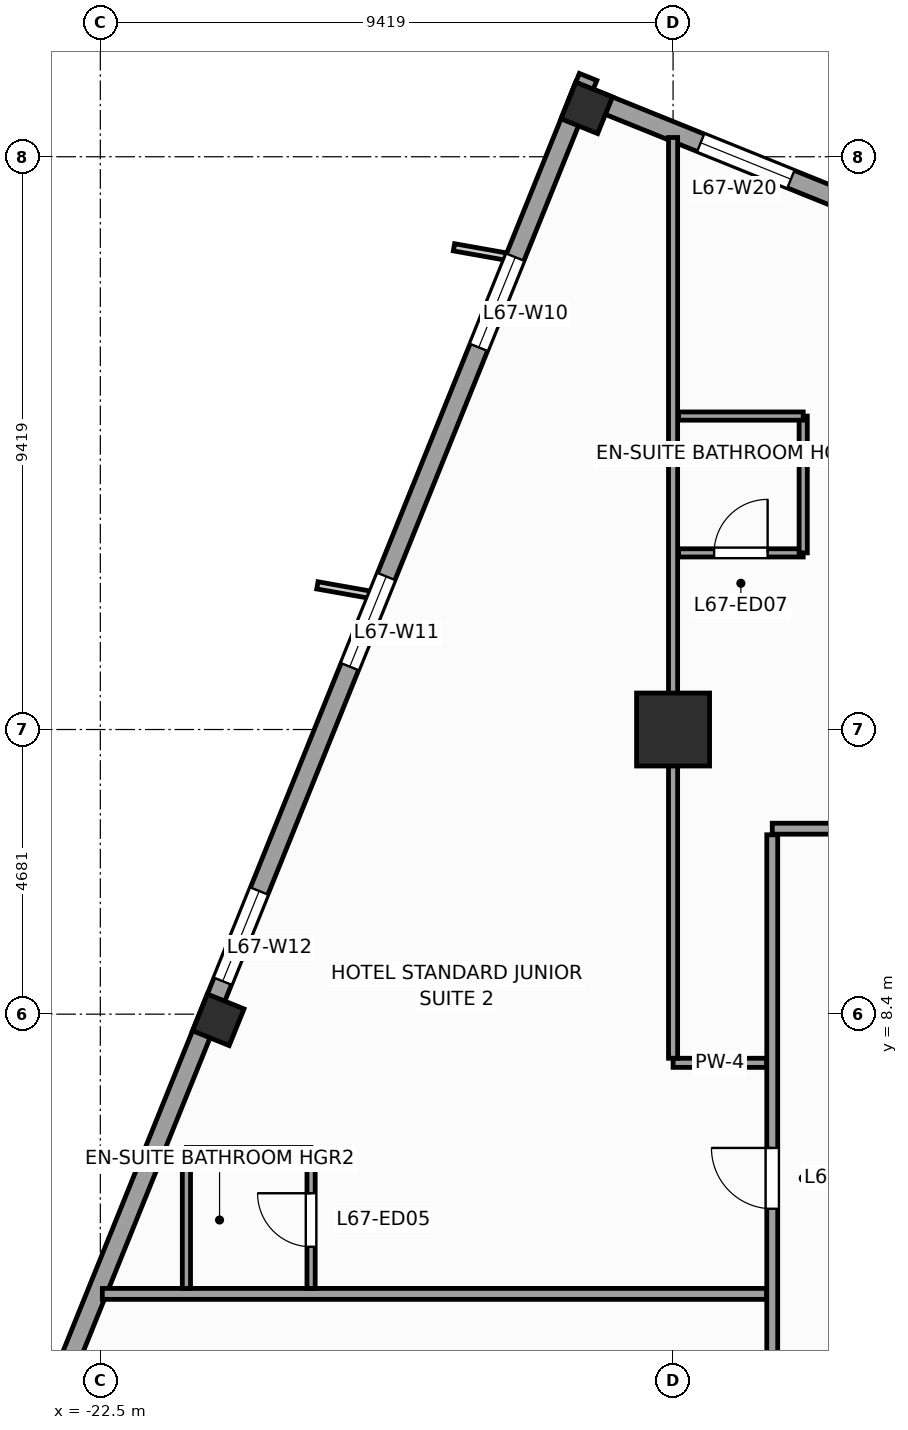
"""IFC4 building model, lengths in metres.
Left out: names, types, materials, properties, quantities, classifications, styles, units other than length and angle.
Written with IfcOpenShell. Run it as: python <this file> out.ifc"""

import sys

from ifc_helpers import new_model, si_unit, direction, frame, frame_2d, origin, origin_2d, place, context, subcontext, project, spatial, rectangle, extrude, source, transform, mapped, element, fill, save


model = new_model("IFC4")
c1 = context("Model", 3, precision=1e-05, world=origin(), true_north=direction((0.0, 1.0)))
c2 = subcontext(c1, "Body", "Model", "MODEL_VIEW")
j1 = project(units=[si_unit("LENGTHUNIT", "METRE"), si_unit("PLANEANGLEUNIT", "RADIAN")], contexts=[c1])
p1 = place(None, origin())
s1 = spatial("IfcSite", under=j1, at=p1, CompositionType="ELEMENT")
p2 = place(p1, origin())
s2 = spatial("IfcBuilding", under=s1, at=p2, CompositionType="ELEMENT")
p3 = place(p2, frame((0.0, 0.0, 276.0)))
s3 = spatial("IfcBuildingStorey", under=s2, at=p3, CompositionType="ELEMENT", Elevation=276.0)
m1 = source(origin(), c2, "Body", "SweptSolid", [
    extrude(rectangle(XDim=1.2, YDim=1.2, at=origin_2d()), origin(), (0.0, 0.0, 1.0), 3.6),
])
p4 = place(p3, frame((-13.081, 13.081, 0.0), z_axis=(0.0, 0.0, 1.0), x_axis=(1.0, 0.0, 0.0)))
e1 = element("IfcColumn", 1, at=p4, inside=s3, PredefinedType="COLUMN", context=c2, shape_type="MappedRepresentation", body=[
    mapped(m1, transform((0.0, 0.0, 0.0), scale=1.0)),
])
m2 = source(origin(), c2, "Body", "SweptSolid", [
    extrude(rectangle(XDim=0.65, YDim=0.65, at=origin_2d()), origin(), (0.0, 0.0, 1.0), 3.6),
])
for number, where, z_axis, x_axis in (
    (2, (-14.501, 23.304, 0.0), (0.0, 0.0, 1.0), (0.375, 0.927, 0.0)),
    (3, (-20.56, 8.307, 0.0), (0.0, 0.0, 1.0), (0.375, 0.927, 0.0)),
):
    element("IfcColumn", number, at=place(p3, frame(where, z_axis=z_axis, x_axis=x_axis)), inside=s3, PredefinedType="COLUMN", context=c2, shape_type="MappedRepresentation", body=[
        mapped(m2, transform((0.0, 0.0, 0.0), scale=1.0)),
    ])
p5 = place(p3, frame((-9.032, 21.278, 0.0), z_axis=(0.0, 0.0, 1.0), x_axis=(-0.927185411764, 0.374602739196, 0.0)))
e4 = element("IfcWall", 4, at=p5, inside=s3, PredefinedType="STANDARD", context=c2, shape_type="SweptSolid", body=[
    extrude(rectangle(XDim=6.155, YDim=0.31, at=frame_2d((3.078, 0.0))), origin(), (0.0, 0.0, 1.0), 3.35),
])
p6 = place(p5, frame((2.278, 0.0, 0.47)))
e5 = element("IfcOpeningElement", 5, at=p6, cuts=e4, PredefinedType="OPENING", context=c2, shape_type="SweptSolid", body=[
    extrude(rectangle(XDim=1.6, YDim=2.1, at=frame_2d((0.8, 1.05))), frame((0.0, 0.165, 0.0), z_axis=(0.0, -1.0, 0.0), x_axis=(1.0, 0.0, 0.0)), (0.0, 0.0, 1.0), 0.33),
])
p7 = place(p3, frame((-14.479, 23.813, 0.0), z_axis=(0.0, 0.0, 1.0), x_axis=(-0.374609557019, -0.927182657188, 0.0)))
e6 = element("IfcWall", 6, at=p7, inside=s3, PredefinedType="STANDARD", context=c2, shape_type="SweptSolid", body=[
    extrude(rectangle(XDim=33.31, YDim=0.31, at=frame_2d((16.655, 0.0))), origin(), (0.0, 0.0, 1.0), 2.75),
])
p8 = place(p7, frame((3.197, 0.0, 0.47)))
e7 = element("IfcOpeningElement", 7, at=p8, cuts=e6, PredefinedType="OPENING", context=c2, shape_type="SweptSolid", body=[
    extrude(rectangle(XDim=1.6, YDim=2.1, at=frame_2d((0.8, 1.05))), frame((0.0, 0.165, 0.0), z_axis=(0.0, -1.0, 0.0), x_axis=(1.0, 0.0, 0.0)), (0.0, 0.0, 1.0), 0.33),
])
p9 = place(p7, frame((8.86, 0.0, 0.47)))
e8 = element("IfcOpeningElement", 8, at=p9, cuts=e6, PredefinedType="OPENING", context=c2, shape_type="SweptSolid", body=[
    extrude(rectangle(XDim=1.6, YDim=2.1, at=frame_2d((0.8, 1.05))), frame((0.0, 0.165, 0.0), z_axis=(0.0, -1.0, 0.0), x_axis=(1.0, 0.0, 0.0)), (0.0, 0.0, 1.0), 0.33),
])
p10 = place(p7, frame((14.439, 0.0, 0.47)))
e9 = element("IfcOpeningElement", 9, at=p10, cuts=e6, PredefinedType="OPENING", context=c2, shape_type="SweptSolid", body=[
    extrude(rectangle(XDim=1.6, YDim=2.1, at=frame_2d((0.8, 1.05))), frame((0.0, 0.165, 0.0), z_axis=(0.0, -1.0, 0.0), x_axis=(1.0, 0.0, 0.0)), (0.0, 0.0, 1.0), 0.33),
])
p11 = place(p7, frame((23.351, 0.0, 0.47)))
e10 = element("IfcOpeningElement", 10, at=p11, cuts=e6, PredefinedType="OPENING", context=c2, shape_type="SweptSolid", body=[
    extrude(rectangle(XDim=1.6, YDim=2.1, at=frame_2d((0.8, 1.05))), frame((0.0, 0.165, 0.0), z_axis=(0.0, -1.0, 0.0), x_axis=(1.0, 0.0, 0.0)), (0.0, 0.0, 1.0), 0.33),
])
p12 = place(p7, frame((30.097, 0.0, 0.47)))
e11 = element("IfcOpeningElement", 11, at=p12, cuts=e6, PredefinedType="OPENING", context=c2, shape_type="SweptSolid", body=[
    extrude(rectangle(XDim=1.6, YDim=2.1, at=frame_2d((0.8, 1.05))), frame((0.0, 0.165, 0.0), z_axis=(0.0, -1.0, 0.0), x_axis=(1.0, 0.0, 0.0)), (0.0, 0.0, 1.0), 0.33),
])
p13 = place(p7, frame((27.59, 0.0, 0.47)))
e12 = element("IfcOpeningElement", 12, at=p13, cuts=e6, PredefinedType="OPENING", context=c2, shape_type="SweptSolid", body=[
    extrude(rectangle(XDim=1.6, YDim=2.1, at=frame_2d((0.8, 1.05))), frame((0.0, 0.165, 0.0), z_axis=(0.0, -1.0, 0.0), x_axis=(1.0, 0.0, 0.0)), (0.0, 0.0, 1.0), 0.33),
])
p14 = place(p3, frame((-11.45, 11.45, 0.0), z_axis=(0.0, 0.0, 1.0), x_axis=(1.0, 0.0, 0.0)))
e13 = element("IfcWall", 13, at=p14, inside=s3, PredefinedType="PARTITIONING", context=c2, shape_type="SweptSolid", body=[
    extrude(rectangle(XDim=21.75, YDim=0.18, at=frame_2d((10.875, 0.0))), origin(), (0.0, 0.0, 1.0), 3.35),
])
p15 = place(p14, frame((2.639, 0.0, 0.0)))
e14 = element("IfcOpeningElement", 14, at=p15, cuts=e13, PredefinedType="OPENING", context=c2, shape_type="SweptSolid", body=[
    extrude(rectangle(XDim=1.0, YDim=2.15, at=frame_2d((0.5, 1.075))), frame((0.0, 0.1, 0.0), z_axis=(0.0, -1.0, 0.0), x_axis=(1.0, 0.0, 0.0)), (0.0, 0.0, 1.0), 0.2),
])
p16 = place(p14, frame((7.8, 0.0, 0.0)))
e15 = element("IfcOpeningElement", 15, at=p16, cuts=e13, PredefinedType="OPENING", context=c2, shape_type="SweptSolid", body=[
    extrude(rectangle(XDim=1.0, YDim=2.15, at=frame_2d((0.5, 1.075))), frame((0.0, 0.1, 0.0), z_axis=(0.0, -1.0, 0.0), x_axis=(1.0, 0.0, 0.0)), (0.0, 0.0, 1.0), 0.2),
])
p17 = place(p14, frame((12.65, 0.0, 0.0)))
e16 = element("IfcOpeningElement", 16, at=p17, cuts=e13, PredefinedType="OPENING", context=c2, shape_type="SweptSolid", body=[
    extrude(rectangle(XDim=1.0, YDim=2.15, at=frame_2d((0.5, 1.075))), frame((0.0, 0.1, 0.0), z_axis=(0.0, -1.0, 0.0), x_axis=(1.0, 0.0, 0.0)), (0.0, 0.0, 1.0), 0.2),
])
p18 = place(p14, frame((18.036, 0.0, 0.0)))
e17 = element("IfcOpeningElement", 17, at=p18, cuts=e13, PredefinedType="OPENING", context=c2, shape_type="SweptSolid", body=[
    extrude(rectangle(XDim=1.0, YDim=2.15, at=frame_2d((0.5, 1.075))), frame((0.0, 0.1, 0.0), z_axis=(0.0, -1.0, 0.0), x_axis=(1.0, 0.0, 0.0)), (0.0, 0.0, 1.0), 0.2),
])
p19 = place(p3, frame((-11.45, -12.35, 0.0), z_axis=(0.0, 0.0, 1.0), x_axis=(0.0, 1.0, 0.0)))
e18 = element("IfcWall", 18, at=p19, inside=s3, PredefinedType="PARTITIONING", context=c2, shape_type="SweptSolid", body=[
    extrude(rectangle(XDim=23.7, YDim=0.18, at=frame_2d((11.85, 0.0))), origin(), (0.0, 0.0, 1.0), 3.35),
])
p20 = place(p19, frame((13.75, 0.0, 0.0)))
e19 = element("IfcOpeningElement", 19, at=p20, cuts=e18, PredefinedType="OPENING", context=c2, shape_type="SweptSolid", body=[
    extrude(rectangle(XDim=1.0, YDim=2.15, at=frame_2d((0.5, 1.075))), frame((0.0, 0.1, 0.0), z_axis=(0.0, -1.0, 0.0), x_axis=(1.0, 0.0, 0.0)), (0.0, 0.0, 1.0), 0.2),
])
p21 = place(p19, frame((17.55, 0.0, 0.0)))
e20 = element("IfcOpeningElement", 20, at=p21, cuts=e18, PredefinedType="OPENING", context=c2, shape_type="SweptSolid", body=[
    extrude(rectangle(XDim=1.0, YDim=2.15, at=frame_2d((0.5, 1.075))), frame((0.0, 0.1, 0.0), z_axis=(0.0, -1.0, 0.0), x_axis=(1.0, 0.0, 0.0)), (0.0, 0.0, 1.0), 0.2),
])
p22 = place(p19, frame((6.15, 0.0, 0.0)))
e21 = element("IfcOpeningElement", 21, at=p22, cuts=e18, PredefinedType="OPENING", context=c2, shape_type="SweptSolid", body=[
    extrude(rectangle(XDim=1.0, YDim=2.15, at=frame_2d((0.5, 1.075))), frame((0.0, 0.1, 0.0), z_axis=(0.0, -1.0, 0.0), x_axis=(1.0, 0.0, 0.0)), (0.0, 0.0, 1.0), 0.2),
])
p23 = place(p19, frame((9.95, 0.0, 0.0)))
e22 = element("IfcOpeningElement", 22, at=p23, cuts=e18, PredefinedType="OPENING", context=c2, shape_type="SweptSolid", body=[
    extrude(rectangle(XDim=1.0, YDim=2.15, at=frame_2d((0.5, 1.075))), frame((0.0, 0.1, 0.0), z_axis=(0.0, -1.0, 0.0), x_axis=(1.0, 0.0, 0.0)), (0.0, 0.0, 1.0), 0.2),
])
p24 = place(p3, frame((-11.545, 3.8, 0.0), z_axis=(0.0, 0.0, 1.0), x_axis=(-1.0, 0.0, 0.0)))
e23 = element("IfcWall", 23, at=p24, inside=s3, PredefinedType="PARTITIONING", context=c2, shape_type="SweptSolid", body=[
    extrude(rectangle(XDim=10.923, YDim=0.18, at=frame_2d((5.461, 0.0))), origin(), (0.0, 0.0, 1.0), 3.02),
])
p25 = place(p3, frame((-11.545, 7.6, 0.0), z_axis=(0.0, 0.0, 1.0), x_axis=(-1.0, 0.0, 0.0)))
e24 = element("IfcWall", 24, at=p25, inside=s3, PredefinedType="PARTITIONING", context=c2, shape_type="SweptSolid", body=[
    extrude(rectangle(XDim=1.536, YDim=0.15, at=frame_2d((0.768, 0.0))), origin(), (0.0, 0.0, 1.0), 3.35),
])
p26 = place(p3, frame((-13.081, 7.675, 0.0), z_axis=(0.0, 0.0, 1.0), x_axis=(0.0, 1.0, 0.0)))
e25 = element("IfcWall", 25, at=p26, inside=s3, PredefinedType="PARTITIONING", context=c2, shape_type="SweptSolid", body=[
    extrude(rectangle(XDim=15.142, YDim=0.15, at=frame_2d((7.571, 0.0))), origin(), (0.0, 0.0, 1.0), 2.45),
])
p27 = place(p3, frame((-19.034, 3.89, 0.0), z_axis=(0.0, 0.0, 1.0), x_axis=(0.0, 1.0, 0.0)))
e26 = element("IfcWall", 26, at=p27, inside=s3, PredefinedType="PARTITIONING", context=c2, shape_type="SweptSolid", body=[
    extrude(rectangle(XDim=2.25, YDim=0.135, at=frame_2d((1.125, 0.0))), origin(), (0.0, 0.0, 1.0), 3.35),
])
p28 = place(p27, frame((0.685, 0.0, 0.0)))
e27 = element("IfcOpeningElement", 27, at=p28, cuts=e26, PredefinedType="OPENING", context=c2, shape_type="SweptSolid", body=[
    extrude(rectangle(XDim=0.88, YDim=2.1, at=frame_2d((0.44, 1.05))), frame((0.0, 0.078, 0.0), z_axis=(0.0, -1.0, 0.0), x_axis=(1.0, 0.0, 0.0)), (0.0, 0.0, 1.0), 0.155),
])
p29 = place(p3, frame((-21.084, 6.14, 0.0), z_axis=(0.0, 0.0, 1.0), x_axis=(1.0, 0.0, 0.0)))
e28 = element("IfcWall", 28, at=p29, inside=s3, PredefinedType="PARTITIONING", context=c2, shape_type="SweptSolid", body=[
    extrude(rectangle(XDim=2.05, YDim=0.135, at=frame_2d((1.025, 0.0))), origin(), (0.0, 0.0, 1.0), 3.35),
])
p30 = place(p3, frame((-21.084, 3.89, 0.0), z_axis=(0.0, 0.0, 1.0), x_axis=(0.0, 1.0, 0.0)))
e29 = element("IfcWall", 29, at=p30, inside=s3, PredefinedType="PARTITIONING", context=c2, shape_type="SweptSolid", body=[
    extrude(rectangle(XDim=2.25, YDim=0.135, at=frame_2d((1.125, 0.0))), origin(), (0.0, 0.0, 1.0), 3.35),
])
p31 = place(p3, frame((-12.991, 15.986, 0.0), z_axis=(0.0, 0.0, 1.0), x_axis=(1.0, 0.0, 0.0)))
e30 = element("IfcWall", 30, at=p31, inside=s3, PredefinedType="PARTITIONING", context=c2, shape_type="SweptSolid", body=[
    extrude(rectangle(XDim=2.05, YDim=0.135, at=frame_2d((1.025, 0.0))), origin(), (0.0, 0.0, 1.0), 3.35),
])
p32 = place(p31, frame((0.585, 0.0, 0.0)))
e31 = element("IfcOpeningElement", 31, at=p32, cuts=e30, PredefinedType="OPENING", context=c2, shape_type="SweptSolid", body=[
    extrude(rectangle(XDim=0.88, YDim=2.1, at=frame_2d((0.44, 1.05))), frame((0.0, 0.078, 0.0), z_axis=(0.0, -1.0, 0.0), x_axis=(1.0, 0.0, 0.0)), (0.0, 0.0, 1.0), 0.155),
])
p33 = place(p3, frame((-10.941, 15.986, 0.0), z_axis=(0.0, 0.0, 1.0), x_axis=(0.0, 1.0, 0.0)))
e32 = element("IfcWall", 32, at=p33, inside=s3, PredefinedType="PARTITIONING", context=c2, shape_type="SweptSolid", body=[
    extrude(rectangle(XDim=2.25, YDim=0.135, at=frame_2d((1.125, 0.0))), origin(), (0.0, 0.0, 1.0), 3.35),
])
p34 = place(p3, frame((-12.991, 18.236, 0.0), z_axis=(0.0, 0.0, 1.0), x_axis=(1.0, 0.0, 0.0)))
e33 = element("IfcWall", 33, at=p34, inside=s3, PredefinedType="PARTITIONING", context=c2, shape_type="SweptSolid", body=[
    extrude(rectangle(XDim=2.05, YDim=0.135, at=frame_2d((1.025, 0.0))), origin(), (0.0, 0.0, 1.0), 3.35),
])
m3 = source(origin(), c2, "Body", "SweptSolid", [
    extrude(rectangle(XDim=1.6, YDim=2.1, at=frame_2d((0.8, 1.05))), frame((0.0, 0.03, 0.0), z_axis=(0.0, -1.0, 0.0), x_axis=(1.0, 0.0, 0.0)), (0.0, 0.0, 1.0), 0.06),
])
p35 = place(p8, origin())
e34 = element("IfcWindow", 34, at=p35, inside=s3, PartitioningType="SINGLE_PANEL", PredefinedType="WINDOW", context=c2, shape_type="MappedRepresentation", body=[
    mapped(m3, transform((0.0, 0.0, 0.0), scale=1.0)),
])
fill(e7, e34)
p36 = place(p9, origin())
e35 = element("IfcWindow", 35, at=p36, inside=s3, PartitioningType="SINGLE_PANEL", PredefinedType="WINDOW", context=c2, shape_type="MappedRepresentation", body=[
    mapped(m3, transform((0.0, 0.0, 0.0), scale=1.0)),
])
fill(e8, e35)
p37 = place(p10, origin())
e36 = element("IfcWindow", 36, at=p37, inside=s3, PartitioningType="SINGLE_PANEL", PredefinedType="WINDOW", context=c2, shape_type="MappedRepresentation", body=[
    mapped(m3, transform((0.0, 0.0, 0.0), scale=1.0)),
])
fill(e9, e36)
p38 = place(p6, origin())
e37 = element("IfcWindow", 37, at=p38, inside=s3, PartitioningType="SINGLE_PANEL", PredefinedType="WINDOW", context=c2, shape_type="MappedRepresentation", body=[
    mapped(m3, transform((0.0, 0.0, 0.0), scale=1.0)),
])
fill(e5, e37)
m4 = source(origin(), c2, "Body", "SweptSolid", [
    extrude(rectangle(XDim=1.0, YDim=2.15, at=frame_2d((0.5, 1.075))), frame((0.0, 0.025, 0.0), z_axis=(0.0, -1.0, 0.0), x_axis=(1.0, 0.0, 0.0)), (0.0, 0.0, 1.0), 0.05),
])
p39 = place(p21, origin())
e38 = element("IfcDoor", 38, at=p39, inside=s3, OperationType="SINGLE_SWING_RIGHT", PredefinedType="DOOR", context=c2, shape_type="MappedRepresentation", body=[
    mapped(m4, transform((0.0, 0.0, 0.0), scale=1.0)),
])
fill(e20, e38)
m5 = source(origin(), c2, "Body", "SweptSolid", [
    extrude(rectangle(XDim=0.88, YDim=2.1, at=frame_2d((0.44, 1.05))), frame((0.0, 0.025, 0.0), z_axis=(0.0, -1.0, 0.0), x_axis=(1.0, 0.0, 0.0)), (0.0, 0.0, 1.0), 0.05),
])
p40 = place(p28, origin())
e39 = element("IfcDoor", 39, at=p40, inside=s3, OperationType="SINGLE_SWING_RIGHT", PredefinedType="DOOR", context=c2, shape_type="MappedRepresentation", body=[
    mapped(m5, transform((0.0, 0.0, 0.0), scale=1.0)),
])
fill(e27, e39)
p41 = place(p32, origin())
e40 = element("IfcDoor", 40, at=p41, inside=s3, OperationType="SINGLE_SWING_RIGHT", PredefinedType="DOOR", context=c2, shape_type="MappedRepresentation", body=[
    mapped(m5, transform((0.0, 0.0, 0.0), scale=1.0)),
])
fill(e31, e40)
save(model, sys.argv[1])
